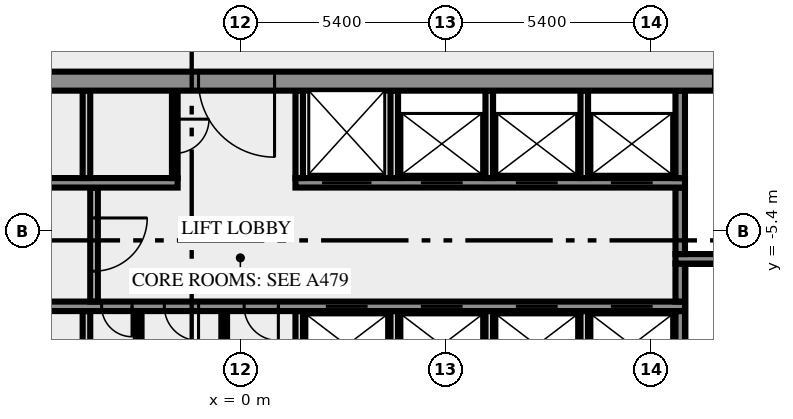
"""IFC4 building model, lengths in metres.
Left out: names, types, materials, properties, quantities, classifications, styles, units other than length and angle.
Written with IfcOpenShell. Run it as: python <this file> out.ifc"""

import sys

from ifc_helpers import new_model, si_unit, direction, frame, frame_2d, origin, place, context, subcontext, project, spatial, rectangle, extrude, element, fill, save


model = new_model("IFC4")
c1 = context("Model", 3, precision=1e-05, world=origin(), true_north=direction((0.0, 1.0)))
c2 = subcontext(c1, "Body", "Model", "MODEL_VIEW")
j1 = project(units=[si_unit("LENGTHUNIT", "METRE"), si_unit("PLANEANGLEUNIT", "RADIAN")], contexts=[c1])
p1 = place(None, origin())
s1 = spatial("IfcSite", under=j1, at=p1, CompositionType="ELEMENT")
p2 = place(p1, origin())
s2 = spatial("IfcBuilding", under=s1, at=p2, CompositionType="ELEMENT")
p3 = place(p2, frame((0.0, 0.0, 148.0)))
s3 = spatial("IfcBuildingStorey", under=s2, at=p3, CompositionType="ELEMENT", Elevation=148.0)
p4 = place(p3, frame((-4.05, -10.5, 0.0), z_axis=(0.0, 0.0, 1.0), x_axis=(0.0, 1.0, 0.0)))
e1 = element("IfcWall", 1, at=p4, inside=s3, PredefinedType="SOLIDWALL", context=c2, shape_type="SweptSolid", body=[
    extrude(rectangle(XDim=3.0, YDim=0.2, at=frame_2d((1.5, 0.0))), origin(), (0.0, 0.0, 1.0), 3.65),
])
for number, where, z_axis, x_axis in (
    (2, (-2.675, -10.5, 0.0), (0.0, 0.0, 1.0), (0.0, 1.0, 0.0)),
    (3, (-0.425, -10.5, 0.0), (0.0, 0.0, 1.0), (0.0, 1.0, 0.0)),
):
    element("IfcWall", number, at=place(p3, frame(where, z_axis=z_axis, x_axis=x_axis)), inside=s3, PredefinedType="PARTITIONING", context=c2, shape_type="SweptSolid", body=[
        extrude(rectangle(XDim=3.0, YDim=0.15, at=frame_2d((1.5, 0.0))), origin(), (0.0, 0.0, 1.0), 3.65),
    ])
for number, where, z_axis, x_axis in (
    (4, (1.55, -10.5, 0.0), (0.0, 0.0, 1.0), (0.0, 1.0, 0.0)),
    (5, (4.05, -10.5, 0.0), (0.0, 0.0, 1.0), (0.0, 1.0, 0.0)),
    (6, (6.55, -10.5, 0.0), (0.0, 0.0, 1.0), (0.0, 1.0, 0.0)),
    (7, (9.05, -10.5, 0.0), (0.0, 0.0, 1.0), (0.0, 1.0, 0.0)),
):
    element("IfcWall", number, at=place(p3, frame(where, z_axis=z_axis, x_axis=x_axis)), inside=s3, PredefinedType="SOLIDWALL", context=c2, shape_type="SweptSolid", body=[
        extrude(rectangle(XDim=3.0, YDim=0.2, at=frame_2d((1.5, 0.0))), origin(), (0.0, 0.0, 1.0), 3.65),
    ])
p5 = place(p3, frame((11.575, -10.5, 0.0), z_axis=(0.0, 0.0, 1.0), x_axis=(0.0, 1.0, 0.0)))
e8 = element("IfcWall", 8, at=p5, inside=s3, PredefinedType="SHEAR", context=c2, shape_type="SweptSolid", body=[
    extrude(rectangle(XDim=3.0, YDim=0.25, at=frame_2d((1.5, 0.0))), origin(), (0.0, 0.0, 1.0), 3.65),
])
p6 = place(p3, frame((11.7, -7.375, 0.0), z_axis=(0.0, 0.0, 1.0), x_axis=(-1.0, 0.0, 0.0)))
e9 = element("IfcWall", 9, at=p6, inside=s3, PredefinedType="SHEAR", context=c2, shape_type="SweptSolid", body=[
    extrude(rectangle(XDim=23.4, YDim=0.25, at=frame_2d((11.7, 0.0))), origin(), (0.0, 0.0, 1.0), 3.65),
])
p7 = place(p6, frame((21.812, 0.0, 0.0)))
e10 = element("IfcOpeningElement", 10, at=p7, cuts=e9, PredefinedType="OPENING", context=c2, shape_type="SweptSolid", body=[
    extrude(rectangle(XDim=0.9, YDim=2.1, at=frame_2d((0.45, 1.05))), frame((0.0, 0.135, 0.0), z_axis=(0.0, -1.0, 0.0), x_axis=(1.0, 0.0, 0.0)), (0.0, 0.0, 1.0), 0.27),
])
p8 = place(p6, frame((19.55, 0.0, 0.0)))
e11 = element("IfcOpeningElement", 11, at=p8, cuts=e9, PredefinedType="OPENING", context=c2, shape_type="SweptSolid", body=[
    extrude(rectangle(XDim=0.9, YDim=2.1, at=frame_2d((0.45, 1.05))), frame((0.0, 0.135, 0.0), z_axis=(0.0, -1.0, 0.0), x_axis=(1.0, 0.0, 0.0)), (0.0, 0.0, 1.0), 0.27),
])
p9 = place(p6, frame((16.787, 0.0, 0.0)))
e12 = element("IfcOpeningElement", 12, at=p9, cuts=e9, PredefinedType="OPENING", context=c2, shape_type="SweptSolid", body=[
    extrude(rectangle(XDim=0.9, YDim=2.1, at=frame_2d((0.45, 1.05))), frame((0.0, 0.135, 0.0), z_axis=(0.0, -1.0, 0.0), x_axis=(1.0, 0.0, 0.0)), (0.0, 0.0, 1.0), 0.27),
])
p10 = place(p6, frame((14.55, 0.0, 0.0)))
e13 = element("IfcOpeningElement", 13, at=p10, cuts=e9, PredefinedType="OPENING", context=c2, shape_type="SweptSolid", body=[
    extrude(rectangle(XDim=0.8, YDim=2.1, at=frame_2d((0.4, 1.05))), frame((0.0, 0.135, 0.0), z_axis=(0.0, -1.0, 0.0), x_axis=(1.0, 0.0, 0.0)), (0.0, 0.0, 1.0), 0.27),
])
p11 = place(p6, frame((12.8, 0.0, 0.0)))
e14 = element("IfcOpeningElement", 14, at=p11, cuts=e9, PredefinedType="OPENING", context=c2, shape_type="SweptSolid", body=[
    extrude(rectangle(XDim=0.9, YDim=2.1, at=frame_2d((0.45, 1.05))), frame((0.0, 0.135, 0.0), z_axis=(0.0, -1.0, 0.0), x_axis=(1.0, 0.0, 0.0)), (0.0, 0.0, 1.0), 0.27),
])
p12 = place(p6, frame((10.7, 0.0, 0.0)))
e15 = element("IfcOpeningElement", 15, at=p12, cuts=e9, PredefinedType="OPENING", context=c2, shape_type="SweptSolid", body=[
    extrude(rectangle(XDim=0.9, YDim=2.1, at=frame_2d((0.45, 1.05))), frame((0.0, 0.135, 0.0), z_axis=(0.0, -1.0, 0.0), x_axis=(1.0, 0.0, 0.0)), (0.0, 0.0, 1.0), 0.27),
])
p13 = place(p6, frame((8.35, 0.0, 0.0)))
e16 = element("IfcOpeningElement", 16, at=p13, cuts=e9, PredefinedType="OPENING", context=c2, shape_type="SweptSolid", body=[
    extrude(rectangle(XDim=1.1, YDim=2.1, at=frame_2d((0.55, 1.05))), frame((0.0, 0.135, 0.0), z_axis=(0.0, -1.0, 0.0), x_axis=(1.0, 0.0, 0.0)), (0.0, 0.0, 1.0), 0.27),
])
p14 = place(p6, frame((5.85, 0.0, 0.0)))
e17 = element("IfcOpeningElement", 17, at=p14, cuts=e9, PredefinedType="OPENING", context=c2, shape_type="SweptSolid", body=[
    extrude(rectangle(XDim=1.1, YDim=2.1, at=frame_2d((0.55, 1.05))), frame((0.0, 0.135, 0.0), z_axis=(0.0, -1.0, 0.0), x_axis=(1.0, 0.0, 0.0)), (0.0, 0.0, 1.0), 0.27),
])
p15 = place(p6, frame((3.35, 0.0, 0.0)))
e18 = element("IfcOpeningElement", 18, at=p15, cuts=e9, PredefinedType="OPENING", context=c2, shape_type="SweptSolid", body=[
    extrude(rectangle(XDim=1.1, YDim=2.1, at=frame_2d((0.55, 1.05))), frame((0.0, 0.135, 0.0), z_axis=(0.0, -1.0, 0.0), x_axis=(1.0, 0.0, 0.0)), (0.0, 0.0, 1.0), 0.27),
])
p16 = place(p6, frame((0.85, 0.0, 0.0)))
e19 = element("IfcOpeningElement", 19, at=p16, cuts=e9, PredefinedType="OPENING", context=c2, shape_type="SweptSolid", body=[
    extrude(rectangle(XDim=1.1, YDim=2.1, at=frame_2d((0.55, 1.05))), frame((0.0, 0.135, 0.0), z_axis=(0.0, -1.0, 0.0), x_axis=(1.0, 0.0, 0.0)), (0.0, 0.0, 1.0), 0.27),
])
p17 = place(p3, frame((-3.85, -4.25, 0.0), z_axis=(0.0, 0.0, 1.0), x_axis=(0.0, -1.0, 0.0)))
e20 = element("IfcWall", 20, at=p17, inside=s3, PredefinedType="SOLIDWALL", context=c2, shape_type="SweptSolid", body=[
    extrude(rectangle(XDim=3.0, YDim=0.2, at=frame_2d((1.5, 0.0))), origin(), (0.0, 0.0, 1.0), 3.65),
])
p18 = place(p17, frame((0.8, 0.0, 0.0)))
e21 = element("IfcOpeningElement", 21, at=p18, cuts=e20, PredefinedType="OPENING", context=c2, shape_type="SweptSolid", body=[
    extrude(rectangle(XDim=1.4, YDim=2.1, at=frame_2d((0.7, 1.05))), frame((0.0, 0.11, 0.0), z_axis=(0.0, -1.0, 0.0), x_axis=(1.0, 0.0, 0.0)), (0.0, 0.0, 1.0), 0.22),
])
p19 = place(p3, frame((11.575, -7.25, 0.0), z_axis=(0.0, 0.0, 1.0), x_axis=(0.0, 1.0, 0.0)))
e22 = element("IfcWall", 22, at=p19, inside=s3, PredefinedType="SHEAR", context=c2, shape_type="SweptSolid", body=[
    extrude(rectangle(XDim=1.0, YDim=0.25, at=frame_2d((0.5, 0.0))), origin(), (0.0, 0.0, 1.0), 3.65),
])
p20 = place(p3, frame((19.5, -6.125, 0.0), z_axis=(0.0, 0.0, 1.0), x_axis=(-1.0, 0.0, 0.0)))
e23 = element("IfcWall", 23, at=p20, inside=s3, PredefinedType="SHEAR", context=c2, shape_type="SweptSolid", body=[
    extrude(rectangle(XDim=8.05, YDim=0.25, at=frame_2d((4.025, 0.0))), origin(), (0.0, 0.0, 1.0), 3.65),
])
p21 = place(p20, frame((0.05, 0.0, 0.0)))
e24 = element("IfcOpeningElement", 24, at=p21, cuts=e23, PredefinedType="OPENING", context=c2, shape_type="SweptSolid", body=[
    extrude(rectangle(XDim=1.8, YDim=2.1, at=frame_2d((0.9, 1.05))), frame((0.0, 0.135, 0.0), z_axis=(0.0, -1.0, 0.0), x_axis=(1.0, 0.0, 0.0)), (0.0, 0.0, 1.0), 0.27),
])
p22 = place(p3, frame((11.575, -6.0, 0.0), z_axis=(0.0, 0.0, 1.0), x_axis=(0.0, 1.0, 0.0)))
e25 = element("IfcWall", 25, at=p22, inside=s3, PredefinedType="SHEAR", context=c2, shape_type="SweptSolid", body=[
    extrude(rectangle(XDim=1.75, YDim=0.25, at=frame_2d((0.875, 0.0))), origin(), (0.0, 0.0, 1.0), 3.65),
])
p23 = place(p3, frame((-11.7, -4.125, 0.0), z_axis=(0.0, 0.0, 1.0), x_axis=(1.0, 0.0, 0.0)))
e26 = element("IfcWall", 26, at=p23, inside=s3, PredefinedType="SHEAR", context=c2, shape_type="SweptSolid", body=[
    extrude(rectangle(XDim=10.05, YDim=0.25, at=frame_2d((5.025, 0.0))), origin(), (0.0, 0.0, 1.0), 3.65),
])
p24 = place(p3, frame((1.45, -4.125, 0.0), z_axis=(0.0, 0.0, 1.0), x_axis=(1.0, 0.0, 0.0)))
e27 = element("IfcWall", 27, at=p24, inside=s3, PredefinedType="SHEAR", context=c2, shape_type="SweptSolid", body=[
    extrude(rectangle(XDim=10.25, YDim=0.25, at=frame_2d((5.125, 0.0))), origin(), (0.0, 0.0, 1.0), 3.65),
])
p25 = place(p24, frame((0.7, 0.0, 0.0)))
e28 = element("IfcOpeningElement", 28, at=p25, cuts=e27, PredefinedType="OPENING", context=c2, shape_type="SweptSolid", body=[
    extrude(rectangle(XDim=1.3, YDim=2.1, at=frame_2d((0.65, 1.05))), frame((0.0, 0.135, 0.0), z_axis=(0.0, -1.0, 0.0), x_axis=(1.0, 0.0, 0.0)), (0.0, 0.0, 1.0), 0.27),
])
p26 = place(p24, frame((3.3, 0.0, 0.0)))
e29 = element("IfcOpeningElement", 29, at=p26, cuts=e27, PredefinedType="OPENING", context=c2, shape_type="SweptSolid", body=[
    extrude(rectangle(XDim=1.1, YDim=2.1, at=frame_2d((0.55, 1.05))), frame((0.0, 0.135, 0.0), z_axis=(0.0, -1.0, 0.0), x_axis=(1.0, 0.0, 0.0)), (0.0, 0.0, 1.0), 0.27),
])
p27 = place(p24, frame((5.8, 0.0, 0.0)))
e30 = element("IfcOpeningElement", 30, at=p27, cuts=e27, PredefinedType="OPENING", context=c2, shape_type="SweptSolid", body=[
    extrude(rectangle(XDim=1.1, YDim=2.1, at=frame_2d((0.55, 1.05))), frame((0.0, 0.135, 0.0), z_axis=(0.0, -1.0, 0.0), x_axis=(1.0, 0.0, 0.0)), (0.0, 0.0, 1.0), 0.27),
])
p28 = place(p24, frame((8.3, 0.0, 0.0)))
e31 = element("IfcOpeningElement", 31, at=p28, cuts=e27, PredefinedType="OPENING", context=c2, shape_type="SweptSolid", body=[
    extrude(rectangle(XDim=1.1, YDim=2.1, at=frame_2d((0.55, 1.05))), frame((0.0, 0.135, 0.0), z_axis=(0.0, -1.0, 0.0), x_axis=(1.0, 0.0, 0.0)), (0.0, 0.0, 1.0), 0.27),
])
p29 = place(p3, frame((-4.05, -4.0, 0.0), z_axis=(0.0, 0.0, 1.0), x_axis=(0.0, 1.0, 0.0)))
e32 = element("IfcWall", 32, at=p29, inside=s3, PredefinedType="SOLIDWALL", context=c2, shape_type="SweptSolid", body=[
    extrude(rectangle(XDim=2.3, YDim=0.2, at=frame_2d((1.15, 0.0))), origin(), (0.0, 0.0, 1.0), 3.65),
])
p30 = place(p3, frame((-1.725, -1.7, 0.0), z_axis=(0.0, 0.0, 1.0), x_axis=(0.0, -1.0, 0.0)))
e33 = element("IfcWall", 33, at=p30, inside=s3, PredefinedType="PARTITIONING", context=c2, shape_type="SweptSolid", body=[
    extrude(rectangle(XDim=2.3, YDim=0.15, at=frame_2d((1.15, 0.0))), origin(), (0.0, 0.0, 1.0), 3.65),
])
p31 = place(p30, frame((0.75, 0.0, 0.0)))
e34 = element("IfcOpeningElement", 34, at=p31, cuts=e33, PredefinedType="OPENING", context=c2, shape_type="SweptSolid", body=[
    extrude(rectangle(XDim=0.9, YDim=2.1, at=frame_2d((0.45, 1.05))), frame((0.0, 0.085, 0.0), z_axis=(0.0, -1.0, 0.0), x_axis=(1.0, 0.0, 0.0)), (0.0, 0.0, 1.0), 0.17),
])
for number, where, z_axis, x_axis in (
    (35, (1.55, -4.0, 0.0), (0.0, 0.0, 1.0), (0.0, 1.0, 0.0)),
    (36, (4.05, -4.0, 0.0), (0.0, 0.0, 1.0), (0.0, 1.0, 0.0)),
    (37, (6.55, -4.0, 0.0), (0.0, 0.0, 1.0), (0.0, 1.0, 0.0)),
    (38, (9.05, -4.0, 0.0), (0.0, 0.0, 1.0), (0.0, 1.0, 0.0)),
):
    element("IfcWall", number, at=place(p3, frame(where, z_axis=z_axis, x_axis=x_axis)), inside=s3, PredefinedType="SOLIDWALL", context=c2, shape_type="SweptSolid", body=[
        extrude(rectangle(XDim=2.3, YDim=0.2, at=frame_2d((1.15, 0.0))), origin(), (0.0, 0.0, 1.0), 3.65),
    ])
p32 = place(p3, frame((11.575, -4.0, 0.0), z_axis=(0.0, 0.0, 1.0), x_axis=(0.0, 1.0, 0.0)))
e39 = element("IfcWall", 39, at=p32, inside=s3, PredefinedType="SHEAR", context=c2, shape_type="SweptSolid", body=[
    extrude(rectangle(XDim=2.3, YDim=0.25, at=frame_2d((1.15, 0.0))), origin(), (0.0, 0.0, 1.0), 3.65),
])
p33 = place(p3, frame((20.49, -1.45, 0.0), z_axis=(0.0, 0.0, 1.0), x_axis=(-1.0, 0.0, 0.0)))
e40 = element("IfcWall", 40, at=p33, inside=s3, PredefinedType="SHEAR", context=c2, shape_type="SweptSolid", body=[
    extrude(rectangle(XDim=40.98, YDim=0.5, at=frame_2d((20.49, 0.0))), origin(), (0.0, 0.0, 1.0), 3.65),
])
p34 = place(p33, frame((38.14, 0.0, 0.0)))
e41 = element("IfcOpeningElement", 41, at=p34, cuts=e40, PredefinedType="OPENING", context=c2, shape_type="SweptSolid", body=[
    extrude(rectangle(XDim=1.8, YDim=2.1, at=frame_2d((0.9, 1.05))), frame((0.0, 0.26, 0.0), z_axis=(0.0, -1.0, 0.0), x_axis=(1.0, 0.0, 0.0)), (0.0, 0.0, 1.0), 0.52),
])
p35 = place(p33, frame((35.89, 0.0, 0.0)))
e42 = element("IfcOpeningElement", 42, at=p35, cuts=e40, PredefinedType="OPENING", context=c2, shape_type="SweptSolid", body=[
    extrude(rectangle(XDim=0.9, YDim=2.1, at=frame_2d((0.45, 1.05))), frame((0.0, 0.26, 0.0), z_axis=(0.0, -1.0, 0.0), x_axis=(1.0, 0.0, 0.0)), (0.0, 0.0, 1.0), 0.52),
])
p36 = place(p33, frame((32.94, 0.0, 0.0)))
e43 = element("IfcOpeningElement", 43, at=p36, cuts=e40, PredefinedType="OPENING", context=c2, shape_type="SweptSolid", body=[
    extrude(rectangle(XDim=0.9, YDim=2.1, at=frame_2d((0.45, 1.05))), frame((0.0, 0.26, 0.0), z_axis=(0.0, -1.0, 0.0), x_axis=(1.0, 0.0, 0.0)), (0.0, 0.0, 1.0), 0.52),
])
p37 = place(p33, frame((29.802, 0.0, 0.0)))
e44 = element("IfcOpeningElement", 44, at=p37, cuts=e40, PredefinedType="OPENING", context=c2, shape_type="SweptSolid", body=[
    extrude(rectangle(XDim=0.9, YDim=2.1, at=frame_2d((0.45, 1.05))), frame((0.0, 0.26, 0.0), z_axis=(0.0, -1.0, 0.0), x_axis=(1.0, 0.0, 0.0)), (0.0, 0.0, 1.0), 0.52),
])
p38 = place(p33, frame((26.077, 0.0, 0.0)))
e45 = element("IfcOpeningElement", 45, at=p38, cuts=e40, PredefinedType="OPENING", context=c2, shape_type="SweptSolid", body=[
    extrude(rectangle(XDim=0.9, YDim=2.1, at=frame_2d((0.45, 1.05))), frame((0.0, 0.26, 0.0), z_axis=(0.0, -1.0, 0.0), x_axis=(1.0, 0.0, 0.0)), (0.0, 0.0, 1.0), 0.52),
])
p39 = place(p33, frame((19.59, 0.0, 0.0)))
e46 = element("IfcOpeningElement", 46, at=p39, cuts=e40, PredefinedType="OPENING", context=c2, shape_type="SweptSolid", body=[
    extrude(rectangle(XDim=2.0, YDim=2.1, at=frame_2d((1.0, 1.05))), frame((0.0, 0.26, 0.0), z_axis=(0.0, -1.0, 0.0), x_axis=(1.0, 0.0, 0.0)), (0.0, 0.0, 1.0), 0.52),
])
p40 = place(p33, frame((7.14, 0.0, 0.0)))
e47 = element("IfcOpeningElement", 47, at=p40, cuts=e40, PredefinedType="OPENING", context=c2, shape_type="SweptSolid", body=[
    extrude(rectangle(XDim=0.9, YDim=2.1, at=frame_2d((0.45, 1.05))), frame((0.0, 0.26, 0.0), z_axis=(0.0, -1.0, 0.0), x_axis=(1.0, 0.0, 0.0)), (0.0, 0.0, 1.0), 0.52),
])
p41 = place(p33, frame((5.028, 0.0, 0.0)))
e48 = element("IfcOpeningElement", 48, at=p41, cuts=e40, PredefinedType="OPENING", context=c2, shape_type="SweptSolid", body=[
    extrude(rectangle(XDim=0.8, YDim=2.1, at=frame_2d((0.4, 1.05))), frame((0.0, 0.26, 0.0), z_axis=(0.0, -1.0, 0.0), x_axis=(1.0, 0.0, 0.0)), (0.0, 0.0, 1.0), 0.52),
])
p42 = place(p33, frame((3.452, 0.0, 0.0)))
e49 = element("IfcOpeningElement", 49, at=p42, cuts=e40, PredefinedType="OPENING", context=c2, shape_type="SweptSolid", body=[
    extrude(rectangle(XDim=0.8, YDim=2.1, at=frame_2d((0.4, 1.05))), frame((0.0, 0.26, 0.0), z_axis=(0.0, -1.0, 0.0), x_axis=(1.0, 0.0, 0.0)), (0.0, 0.0, 1.0), 0.52),
])
p43 = place(p33, frame((1.04, 0.0, 0.0)))
e50 = element("IfcOpeningElement", 50, at=p43, cuts=e40, PredefinedType="OPENING", context=c2, shape_type="SweptSolid", body=[
    extrude(rectangle(XDim=1.8, YDim=2.1, at=frame_2d((0.9, 1.05))), frame((0.0, 0.26, 0.0), z_axis=(0.0, -1.0, 0.0), x_axis=(1.0, 0.0, 0.0)), (0.0, 0.0, 1.0), 0.52),
])
p44 = place(p10, origin())
e51 = element("IfcDoor", 51, at=p44, inside=s3, OperationType="SINGLE_SWING_RIGHT", PredefinedType="DOOR", context=c2, shape_type="SweptSolid", body=[
    extrude(rectangle(XDim=0.8, YDim=2.1, at=frame_2d((0.4, 1.05))), frame((0.0, 0.025, 0.0), z_axis=(0.0, -1.0, 0.0), x_axis=(1.0, 0.0, 0.0)), (0.0, 0.0, 1.0), 0.05),
])
fill(e13, e51)
p45 = place(p11, origin())
e52 = element("IfcDoor", 52, at=p45, inside=s3, OperationType="SINGLE_SWING_RIGHT", PredefinedType="DOOR", context=c2, shape_type="SweptSolid", body=[
    extrude(rectangle(XDim=0.9, YDim=2.1, at=frame_2d((0.45, 1.05))), frame((0.0, 0.025, 0.0), z_axis=(0.0, -1.0, 0.0), x_axis=(1.0, 0.0, 0.0)), (0.0, 0.0, 1.0), 0.05),
])
fill(e14, e52)
p46 = place(p12, origin())
e53 = element("IfcDoor", 53, at=p46, inside=s3, OperationType="SINGLE_SWING_LEFT", PredefinedType="DOOR", context=c2, shape_type="SweptSolid", body=[
    extrude(rectangle(XDim=0.9, YDim=2.1, at=frame_2d((0.45, 1.05))), frame((0.0, 0.025, 0.0), z_axis=(0.0, -1.0, 0.0), x_axis=(1.0, 0.0, 0.0)), (0.0, 0.0, 1.0), 0.05),
])
fill(e15, e53)
p47 = place(p13, origin())
e54 = element("IfcDoor", 54, at=p47, inside=s3, OperationType="DOUBLE_DOOR_SLIDING", PredefinedType="DOOR", context=c2, shape_type="SweptSolid", body=[
    extrude(rectangle(XDim=1.1, YDim=2.1, at=frame_2d((0.55, 1.05))), frame((0.0, 0.025, 0.0), z_axis=(0.0, -1.0, 0.0), x_axis=(1.0, 0.0, 0.0)), (0.0, 0.0, 1.0), 0.05),
])
fill(e16, e54)
p48 = place(p14, origin())
e55 = element("IfcDoor", 55, at=p48, inside=s3, OperationType="DOUBLE_DOOR_SLIDING", PredefinedType="DOOR", context=c2, shape_type="SweptSolid", body=[
    extrude(rectangle(XDim=1.1, YDim=2.1, at=frame_2d((0.55, 1.05))), frame((0.0, 0.025, 0.0), z_axis=(0.0, -1.0, 0.0), x_axis=(1.0, 0.0, 0.0)), (0.0, 0.0, 1.0), 0.05),
])
fill(e17, e55)
p49 = place(p15, origin())
e56 = element("IfcDoor", 56, at=p49, inside=s3, OperationType="DOUBLE_DOOR_SLIDING", PredefinedType="DOOR", context=c2, shape_type="SweptSolid", body=[
    extrude(rectangle(XDim=1.1, YDim=2.1, at=frame_2d((0.55, 1.05))), frame((0.0, 0.025, 0.0), z_axis=(0.0, -1.0, 0.0), x_axis=(1.0, 0.0, 0.0)), (0.0, 0.0, 1.0), 0.05),
])
fill(e18, e56)
p50 = place(p16, origin())
e57 = element("IfcDoor", 57, at=p50, inside=s3, OperationType="DOUBLE_DOOR_SLIDING", PredefinedType="DOOR", context=c2, shape_type="SweptSolid", body=[
    extrude(rectangle(XDim=1.1, YDim=2.1, at=frame_2d((0.55, 1.05))), frame((0.0, 0.025, 0.0), z_axis=(0.0, -1.0, 0.0), x_axis=(1.0, 0.0, 0.0)), (0.0, 0.0, 1.0), 0.05),
])
fill(e19, e57)
p51 = place(p18, origin())
e58 = element("IfcDoor", 58, at=p51, inside=s3, OperationType="DOUBLE_DOOR_SINGLE_SWING", PredefinedType="DOOR", context=c2, shape_type="SweptSolid", body=[
    extrude(rectangle(XDim=1.4, YDim=2.1, at=frame_2d((0.7, 1.05))), frame((0.0, 0.025, 0.0), z_axis=(0.0, -1.0, 0.0), x_axis=(1.0, 0.0, 0.0)), (0.0, 0.0, 1.0), 0.05),
])
fill(e21, e58)
p52 = place(p25, origin())
e59 = element("IfcDoor", 59, at=p52, inside=s3, OperationType="DOUBLE_DOOR_SLIDING", PredefinedType="DOOR", context=c2, shape_type="SweptSolid", body=[
    extrude(rectangle(XDim=1.3, YDim=2.1, at=frame_2d((0.65, 1.05))), frame((0.0, 0.025, 0.0), z_axis=(0.0, -1.0, 0.0), x_axis=(1.0, 0.0, 0.0)), (0.0, 0.0, 1.0), 0.05),
])
fill(e28, e59)
p53 = place(p26, origin())
e60 = element("IfcDoor", 60, at=p53, inside=s3, OperationType="DOUBLE_DOOR_SLIDING", PredefinedType="DOOR", context=c2, shape_type="SweptSolid", body=[
    extrude(rectangle(XDim=1.1, YDim=2.1, at=frame_2d((0.55, 1.05))), frame((0.0, 0.025, 0.0), z_axis=(0.0, -1.0, 0.0), x_axis=(1.0, 0.0, 0.0)), (0.0, 0.0, 1.0), 0.05),
])
fill(e29, e60)
p54 = place(p27, origin())
e61 = element("IfcDoor", 61, at=p54, inside=s3, OperationType="DOUBLE_DOOR_SLIDING", PredefinedType="DOOR", context=c2, shape_type="SweptSolid", body=[
    extrude(rectangle(XDim=1.1, YDim=2.1, at=frame_2d((0.55, 1.05))), frame((0.0, 0.025, 0.0), z_axis=(0.0, -1.0, 0.0), x_axis=(1.0, 0.0, 0.0)), (0.0, 0.0, 1.0), 0.05),
])
fill(e30, e61)
p55 = place(p28, origin())
e62 = element("IfcDoor", 62, at=p55, inside=s3, OperationType="DOUBLE_DOOR_SLIDING", PredefinedType="DOOR", context=c2, shape_type="SweptSolid", body=[
    extrude(rectangle(XDim=1.1, YDim=2.1, at=frame_2d((0.55, 1.05))), frame((0.0, 0.025, 0.0), z_axis=(0.0, -1.0, 0.0), x_axis=(1.0, 0.0, 0.0)), (0.0, 0.0, 1.0), 0.05),
])
fill(e31, e62)
p56 = place(p31, origin())
e63 = element("IfcDoor", 63, at=p56, inside=s3, OperationType="SINGLE_SWING_RIGHT", PredefinedType="DOOR", context=c2, shape_type="SweptSolid", body=[
    extrude(rectangle(XDim=0.9, YDim=2.1, at=frame_2d((0.45, 1.05))), frame((0.0, 0.025, 0.0), z_axis=(0.0, -1.0, 0.0), x_axis=(1.0, 0.0, 0.0)), (0.0, 0.0, 1.0), 0.05),
])
fill(e34, e63)
p57 = place(p39, origin())
e64 = element("IfcDoor", 64, at=p57, inside=s3, OperationType="DOUBLE_DOOR_SINGLE_SWING", PredefinedType="DOOR", context=c2, shape_type="SweptSolid", body=[
    extrude(rectangle(XDim=2.0, YDim=2.1, at=frame_2d((1.0, 1.05))), frame((0.0, 0.025, 0.0), z_axis=(0.0, -1.0, 0.0), x_axis=(1.0, 0.0, 0.0)), (0.0, 0.0, 1.0), 0.05),
])
fill(e46, e64)
save(model, sys.argv[1])
